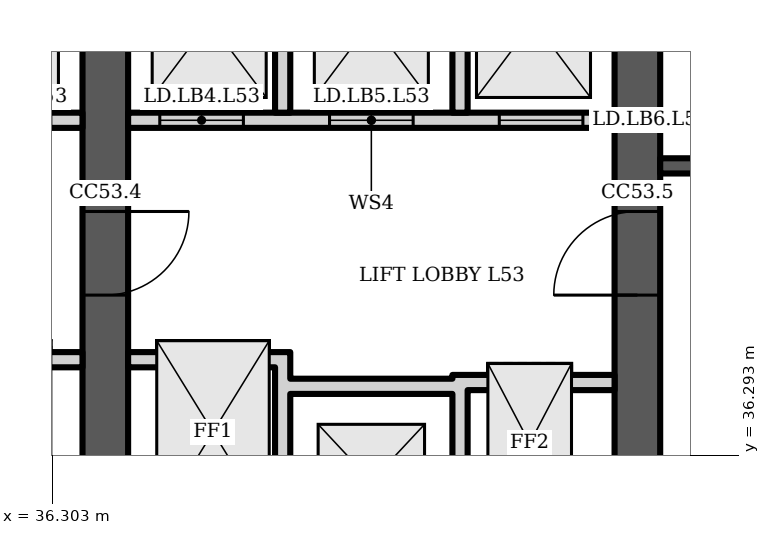
"""IFC4 building model, lengths in metres.
Left out: names, types, materials, properties, quantities, classifications, styles, units other than length and angle.
Written with IfcOpenShell. Run it as: python <this file> out.ifc"""

import sys

from ifc_helpers import new_model, si_unit, direction, frame, frame_2d, origin, place, context, subcontext, project, spatial, polyline, rectangle, outline, extrude, element, fill, save


model = new_model("IFC4")
c1 = context("Model", 3, precision=1e-05, world=origin(), true_north=direction((0.0, 1.0)))
c2 = subcontext(c1, "Body", "Model", "MODEL_VIEW")
j1 = project(units=[si_unit("LENGTHUNIT", "METRE"), si_unit("PLANEANGLEUNIT", "RADIAN")], contexts=[c1])
p1 = place(None, origin())
s1 = spatial("IfcSite", under=j1, at=p1, CompositionType="ELEMENT")
p2 = place(p1, origin())
s2 = spatial("IfcBuilding", under=s1, at=p2, CompositionType="ELEMENT")
p3 = place(p2, frame((0.0, 0.0, 214.3)))
s3 = spatial("IfcBuildingStorey", under=s2, at=p3, CompositionType="ELEMENT", Elevation=214.3)
p4 = place(p3, frame((37.0, 34.6, 0.0), z_axis=(0.0, 0.0, 1.0), x_axis=(0.0, 1.0, 0.0)))
e1 = element("IfcWall", 1, at=p4, inside=s3, PredefinedType="SHEAR", context=c2, shape_type="SweptSolid", body=[
    extrude(rectangle(XDim=14.784, YDim=0.6, at=frame_2d((7.392, 0.0))), origin(), (0.0, 0.0, 1.0), 3.6),
])
p5 = place(p4, frame((11.302, 0.0, 0.0)))
e2 = element("IfcOpeningElement", 2, at=p5, cuts=e1, PredefinedType="OPENING", context=c2, shape_type="SweptSolid", body=[
    extrude(rectangle(XDim=1.0, YDim=2.1, at=frame_2d((0.5, 1.05))), frame((0.0, 0.31, 0.0), z_axis=(0.0, -1.0, 0.0), x_axis=(1.0, 0.0, 0.0)), (0.0, 0.0, 1.0), 0.62),
])
p6 = place(p4, frame((3.8, 0.0, 0.0)))
e3 = element("IfcOpeningElement", 3, at=p6, cuts=e1, PredefinedType="OPENING", context=c2, shape_type="SweptSolid", body=[
    extrude(rectangle(XDim=1.1, YDim=2.1, at=frame_2d((0.55, 1.05))), frame((0.0, 0.31, 0.0), z_axis=(0.0, -1.0, 0.0), x_axis=(1.0, 0.0, 0.0)), (0.0, 0.0, 1.0), 0.62),
])
p7 = place(p3, frame((44.0, 34.6, 0.0), z_axis=(0.0, 0.0, 1.0), x_axis=(0.0, 1.0, 0.0)))
e4 = element("IfcWall", 4, at=p7, inside=s3, PredefinedType="SHEAR", context=c2, shape_type="SweptSolid", body=[
    extrude(rectangle(XDim=14.784, YDim=0.6, at=frame_2d((7.392, 0.0))), origin(), (0.0, 0.0, 1.0), 3.6),
])
p8 = place(p7, frame((11.608, 0.0, 0.0)))
e5 = element("IfcOpeningElement", 5, at=p8, cuts=e4, PredefinedType="OPENING", context=c2, shape_type="SweptSolid", body=[
    extrude(rectangle(XDim=1.0, YDim=2.1, at=frame_2d((0.5, 1.05))), frame((0.0, 0.31, 0.0), z_axis=(0.0, -1.0, 0.0), x_axis=(1.0, 0.0, 0.0)), (0.0, 0.0, 1.0), 0.62),
])
p9 = place(p7, frame((3.8, 0.0, 0.0)))
e6 = element("IfcOpeningElement", 6, at=p9, cuts=e4, PredefinedType="OPENING", context=c2, shape_type="SweptSolid", body=[
    extrude(rectangle(XDim=1.1, YDim=2.1, at=frame_2d((0.55, 1.05))), frame((0.0, 0.31, 0.0), z_axis=(0.0, -1.0, 0.0), x_axis=(1.0, 0.0, 0.0)), (0.0, 0.0, 1.0), 0.62),
])
p10 = place(p3, frame((30.3, 40.7, 0.0), z_axis=(0.0, 0.0, 1.0), x_axis=(1.0, 0.0, 0.0)))
e7 = element("IfcWall", 7, at=p10, inside=s3, PredefinedType="PARTITIONING", context=c2, shape_type="SweptSolid", body=[
    extrude(rectangle(XDim=6.4, YDim=0.2, at=frame_2d((3.2, 0.0))), origin(), (0.0, 0.0, 1.0), 3.2),
])
p11 = place(p10, frame((0.417, 0.0, 0.0)))
e8 = element("IfcOpeningElement", 8, at=p11, cuts=e7, PredefinedType="OPENING", context=c2, shape_type="SweptSolid", body=[
    extrude(rectangle(XDim=1.1, YDim=2.1, at=frame_2d((0.55, 1.05))), frame((0.0, 0.11, 0.0), z_axis=(0.0, -1.0, 0.0), x_axis=(1.0, 0.0, 0.0)), (0.0, 0.0, 1.0), 0.22),
])
p12 = place(p10, frame((2.65, 0.0, 0.0)))
e9 = element("IfcOpeningElement", 9, at=p12, cuts=e7, PredefinedType="OPENING", context=c2, shape_type="SweptSolid", body=[
    extrude(rectangle(XDim=1.1, YDim=2.1, at=frame_2d((0.55, 1.05))), frame((0.0, 0.11, 0.0), z_axis=(0.0, -1.0, 0.0), x_axis=(1.0, 0.0, 0.0)), (0.0, 0.0, 1.0), 0.22),
])
p13 = place(p10, frame((4.883, 0.0, 0.0)))
e10 = element("IfcOpeningElement", 10, at=p13, cuts=e7, PredefinedType="OPENING", context=c2, shape_type="SweptSolid", body=[
    extrude(rectangle(XDim=1.1, YDim=2.1, at=frame_2d((0.55, 1.05))), frame((0.0, 0.11, 0.0), z_axis=(0.0, -1.0, 0.0), x_axis=(1.0, 0.0, 0.0)), (0.0, 0.0, 1.0), 0.22),
])
p14 = place(p3, frame((0.0, 0.0, -0.0)))
e11 = element("IfcWall", 11, at=p14, inside=s3, PredefinedType="PARTITIONING", context=c2, shape_type="SweptSolid", body=[
    extrude(outline(polyline([(34.567, 37.65), (34.767, 37.65), (36.7, 37.65), (36.7, 37.45), (34.767, 37.45), (34.767, 34.6), (34.567, 34.6), (34.567, 37.65)])), origin(), (0.0, 0.0, 1.0), 3.2),
])
p15 = place(p3, frame((0.0, 0.0, -0.0)))
e12 = element("IfcWall", 12, at=p15, inside=s3, PredefinedType="PARTITIONING", context=c2, shape_type="SweptSolid", body=[
    extrude(outline(polyline([(32.433, 40.8), (32.233, 40.8), (32.233, 43.8), (30.3, 43.8), (30.3, 44.0), (36.7, 44.0), (36.7, 43.8), (34.767, 43.8), (34.767, 40.8), (34.567, 40.8), (34.567, 43.8), (32.433, 43.8), (32.433, 40.8)])), origin(), (0.0, 0.0, 1.0), 3.2),
])
p16 = place(p3, frame((37.3, 40.7, 0.0), z_axis=(0.0, 0.0, 1.0), x_axis=(1.0, 0.0, 0.0)))
e13 = element("IfcWall", 13, at=p16, inside=s3, PredefinedType="PARTITIONING", context=c2, shape_type="SweptSolid", body=[
    extrude(rectangle(XDim=6.4, YDim=0.2, at=frame_2d((3.2, 0.0))), origin(), (0.0, 0.0, 1.0), 3.2),
])
p17 = place(p16, frame((0.417, 0.0, 0.0)))
e14 = element("IfcOpeningElement", 14, at=p17, cuts=e13, PredefinedType="OPENING", context=c2, shape_type="SweptSolid", body=[
    extrude(rectangle(XDim=1.1, YDim=2.1, at=frame_2d((0.55, 1.05))), frame((0.0, 0.11, 0.0), z_axis=(0.0, -1.0, 0.0), x_axis=(1.0, 0.0, 0.0)), (0.0, 0.0, 1.0), 0.22),
])
p18 = place(p16, frame((2.65, 0.0, 0.0)))
e15 = element("IfcOpeningElement", 15, at=p18, cuts=e13, PredefinedType="OPENING", context=c2, shape_type="SweptSolid", body=[
    extrude(rectangle(XDim=1.1, YDim=2.1, at=frame_2d((0.55, 1.05))), frame((0.0, 0.11, 0.0), z_axis=(0.0, -1.0, 0.0), x_axis=(1.0, 0.0, 0.0)), (0.0, 0.0, 1.0), 0.22),
])
p19 = place(p16, frame((4.883, 0.0, 0.0)))
e16 = element("IfcOpeningElement", 16, at=p19, cuts=e13, PredefinedType="OPENING", context=c2, shape_type="SweptSolid", body=[
    extrude(rectangle(XDim=1.1, YDim=2.1, at=frame_2d((0.55, 1.05))), frame((0.0, 0.11, 0.0), z_axis=(0.0, -1.0, 0.0), x_axis=(1.0, 0.0, 0.0)), (0.0, 0.0, 1.0), 0.22),
])
p20 = place(p3, frame((0.0, 0.0, -0.0)))
e17 = element("IfcWall", 17, at=p20, inside=s3, PredefinedType="PARTITIONING", context=c2, shape_type="SweptSolid", body=[
    extrude(outline(polyline([(41.567, 37.1), (39.433, 37.1), (39.433, 34.6), (39.233, 34.6), (39.233, 37.45), (37.3, 37.45), (37.3, 37.65), (39.233, 37.65), (39.433, 37.65), (39.433, 37.3), (41.567, 37.3), (41.567, 37.35), (41.767, 37.35), (43.7, 37.35), (43.7, 37.15), (41.767, 37.15), (41.767, 34.6), (41.567, 34.6), (41.567, 37.1)])), origin(), (0.0, 0.0, 1.0), 3.2),
])
p21 = place(p3, frame((0.0, 0.0, -0.0)))
e18 = element("IfcWall", 18, at=p21, inside=s3, PredefinedType="PARTITIONING", context=c2, shape_type="SweptSolid", body=[
    extrude(outline(polyline([(39.433, 40.8), (39.233, 40.8), (39.233, 43.8), (37.3, 43.8), (37.3, 44.0), (43.7, 44.0), (43.7, 43.8), (41.767, 43.8), (41.767, 40.8), (41.567, 40.8), (41.567, 43.8), (39.433, 43.8), (39.433, 40.8)])), origin(), (0.0, 0.0, 1.0), 3.2),
])
p22 = place(p3, frame((44.3, 40.1, 0.0), z_axis=(0.0, 0.0, 1.0), x_axis=(1.0, 0.0, 0.0)))
e19 = element("IfcWall", 19, at=p22, inside=s3, PredefinedType="SHEAR", context=c2, shape_type="SweptSolid", body=[
    extrude(rectangle(XDim=6.4, YDim=0.2, at=frame_2d((3.2, 0.0))), origin(), (0.0, 0.0, 1.0), 3.2),
])
p23 = place(p22, frame((3.625, 0.0, 0.0)))
e20 = element("IfcOpeningElement", 20, at=p23, cuts=e19, PredefinedType="OPENING", context=c2, shape_type="SweptSolid", body=[
    extrude(rectangle(XDim=1.2, YDim=2.1, at=frame_2d((0.6, 1.05))), frame((0.0, 0.11, 0.0), z_axis=(0.0, -1.0, 0.0), x_axis=(1.0, 0.0, 0.0)), (0.0, 0.0, 1.0), 0.22),
])
p24 = place(p22, frame((0.625, 0.0, 0.0)))
e21 = element("IfcOpeningElement", 21, at=p24, cuts=e19, PredefinedType="OPENING", context=c2, shape_type="SweptSolid", body=[
    extrude(rectangle(XDim=0.9, YDim=2.1, at=frame_2d((0.45, 1.05))), frame((0.0, 0.11, 0.0), z_axis=(0.0, -1.0, 0.0), x_axis=(1.0, 0.0, 0.0)), (0.0, 0.0, 1.0), 0.22),
])
p25 = place(p17, origin())
e22 = element("IfcDoor", 22, at=p25, inside=s3, OperationType="DOUBLE_DOOR_SLIDING", PredefinedType="DOOR", context=c2, shape_type="SweptSolid", body=[
    extrude(rectangle(XDim=1.1, YDim=2.1, at=frame_2d((0.55, 1.05))), frame((0.0, 0.025, 0.0), z_axis=(0.0, -1.0, 0.0), x_axis=(1.0, 0.0, 0.0)), (0.0, 0.0, 1.0), 0.05),
])
fill(e14, e22)
p26 = place(p18, origin())
e23 = element("IfcDoor", 23, at=p26, inside=s3, OperationType="DOUBLE_DOOR_SLIDING", PredefinedType="DOOR", context=c2, shape_type="SweptSolid", body=[
    extrude(rectangle(XDim=1.1, YDim=2.1, at=frame_2d((0.55, 1.05))), frame((0.0, 0.025, 0.0), z_axis=(0.0, -1.0, 0.0), x_axis=(1.0, 0.0, 0.0)), (0.0, 0.0, 1.0), 0.05),
])
fill(e15, e23)
p27 = place(p19, origin())
e24 = element("IfcDoor", 24, at=p27, inside=s3, OperationType="DOUBLE_DOOR_SLIDING", PredefinedType="DOOR", context=c2, shape_type="SweptSolid", body=[
    extrude(rectangle(XDim=1.1, YDim=2.1, at=frame_2d((0.55, 1.05))), frame((0.0, 0.025, 0.0), z_axis=(0.0, -1.0, 0.0), x_axis=(1.0, 0.0, 0.0)), (0.0, 0.0, 1.0), 0.05),
])
fill(e16, e24)
p28 = place(p6, origin())
e25 = element("IfcDoor", 25, at=p28, inside=s3, OperationType="SINGLE_SWING_RIGHT", PredefinedType="DOOR", context=c2, shape_type="SweptSolid", body=[
    extrude(rectangle(XDim=1.1, YDim=2.1, at=frame_2d((0.55, 1.05))), frame((0.0, 0.025, 0.0), z_axis=(0.0, -1.0, 0.0), x_axis=(1.0, 0.0, 0.0)), (0.0, 0.0, 1.0), 0.05),
])
fill(e3, e25)
p29 = place(p9, origin())
e26 = element("IfcDoor", 26, at=p29, inside=s3, OperationType="SINGLE_SWING_LEFT", PredefinedType="DOOR", context=c2, shape_type="SweptSolid", body=[
    extrude(rectangle(XDim=1.1, YDim=2.1, at=frame_2d((0.55, 1.05))), frame((0.0, 0.025, 0.0), z_axis=(0.0, -1.0, 0.0), x_axis=(1.0, 0.0, 0.0)), (0.0, 0.0, 1.0), 0.05),
])
fill(e6, e26)
save(model, sys.argv[1])
